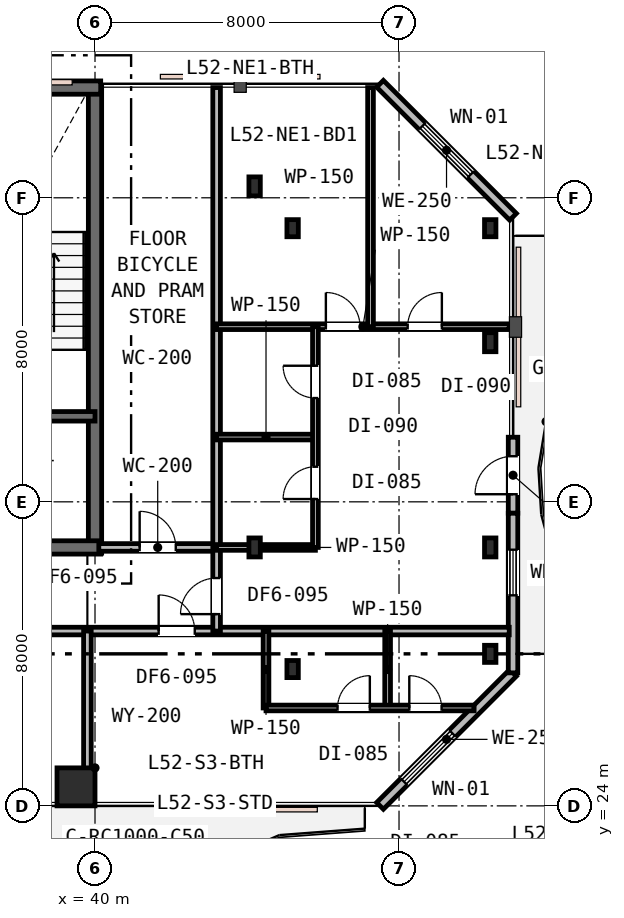
"""IFC4 building model, lengths in metres.
Left out: names, types, materials, properties, quantities, classifications, styles, units other than length and angle.
Written with IfcOpenShell. Run it as: python <this file> out.ifc"""

import sys

from ifc_helpers import new_model, si_unit, direction, frame, frame_2d, origin, origin_2d, place, context, subcontext, project, spatial, rectangle, i_section, extrude, element, fill, save


model = new_model("IFC4")
c1 = context("Model", 3, precision=1e-05, world=origin(), true_north=direction((0.0, 1.0)))
c2 = subcontext(c1, "Body", "Model", "MODEL_VIEW")
j1 = project(units=[si_unit("LENGTHUNIT", "METRE"), si_unit("PLANEANGLEUNIT", "RADIAN")], contexts=[c1])
p1 = place(None, origin())
s1 = spatial("IfcSite", under=j1, at=p1, CompositionType="ELEMENT")
p2 = place(p1, origin())
s2 = spatial("IfcBuilding", under=s1, at=p2, CompositionType="ELEMENT")
p3 = place(p2, frame((0.0, 0.0, 201.0)))
s3 = spatial("IfcBuildingStorey", under=s2, at=p3, CompositionType="ELEMENT", Elevation=201.0)
p4 = place(p3, frame((40.0, 30.65, 0.0), z_axis=(0.0, 0.0, 1.0), x_axis=(0.0, 1.0, 0.0)))
e1 = element("IfcWall", 1, at=p4, inside=s3, PredefinedType="SHEAR", context=c2, shape_type="SweptSolid", body=[
    extrude(rectangle(XDim=12.3, YDim=0.35, at=frame_2d((6.15, 0.0))), origin(), (0.0, 0.0, 1.0), 3.6),
])
p5 = place(p3, frame((15.85, 42.9, 0.0), z_axis=(0.0, 0.0, 1.0), x_axis=(1.0, 0.0, 0.0)))
e2 = element("IfcWall", 2, at=p5, inside=s3, PredefinedType="SHEAR", context=c2, shape_type="SweptSolid", body=[
    extrude(rectangle(XDim=24.3, YDim=0.35, at=frame_2d((12.15, 0.0))), origin(), (0.0, 0.0, 1.0), 3.6),
])
p6 = place(p3, frame((28.95, 30.8, 0.0), z_axis=(0.0, 0.0, 1.0), x_axis=(1.0, 0.0, 0.0)))
e3 = element("IfcWall", 3, at=p6, inside=s3, PredefinedType="SHEAR", context=c2, shape_type="SweptSolid", body=[
    extrude(rectangle(XDim=11.2, YDim=0.35, at=frame_2d((5.6, 0.0))), origin(), (0.0, 0.0, 1.0), 3.6),
])
p7 = place(p6, frame((7.65, 0.0, 0.0)))
e4 = element("IfcOpeningElement", 4, at=p7, cuts=e3, PredefinedType="OPENING", context=c2, shape_type="SweptSolid", body=[
    extrude(rectangle(XDim=1.1, YDim=2.15, at=frame_2d((0.55, 1.075))), frame((0.0, 0.185, 0.0), z_axis=(0.0, -1.0, 0.0), x_axis=(1.0, 0.0, 0.0)), (0.0, 0.0, 1.0), 0.37),
])
p8 = place(p3, frame((33.95, 34.25, 0.0), z_axis=(0.0, 0.0, 1.0), x_axis=(1.0, 0.0, 0.0)))
e5 = element("IfcWall", 5, at=p8, inside=s3, PredefinedType="SHEAR", context=c2, shape_type="SweptSolid", body=[
    extrude(rectangle(XDim=6.05, YDim=0.25, at=frame_2d((3.025, 0.0))), origin(), (0.0, 0.0, 1.0), 3.6),
])
p9 = place(p8, frame((3.7, 0.0, 0.0)))
e6 = element("IfcOpeningElement", 6, at=p9, cuts=e5, PredefinedType="OPENING", context=c2, shape_type="SweptSolid", body=[
    extrude(rectangle(XDim=1.0, YDim=2.15, at=frame_2d((0.5, 1.075))), frame((0.0, 0.135, 0.0), z_axis=(0.0, -1.0, 0.0), x_axis=(1.0, 0.0, 0.0)), (0.0, 0.0, 1.0), 0.27),
])
p10 = place(p8, frame((0.55, 0.0, 0.0)))
e7 = element("IfcOpeningElement", 7, at=p10, cuts=e5, PredefinedType="OPENING", context=c2, shape_type="SweptSolid", body=[
    extrude(rectangle(XDim=1.1, YDim=2.15, at=frame_2d((0.55, 1.075))), frame((0.0, 0.135, 0.0), z_axis=(0.0, -1.0, 0.0), x_axis=(1.0, 0.0, 0.0)), (0.0, 0.0, 1.0), 0.27),
])
p11 = place(p3, frame((39.5, 24.5, 0.0), z_axis=(0.0, 0.0, 1.0), x_axis=(1.0, 0.0, 0.0)))
e8 = element("IfcColumn", 8, at=p11, inside=s3, PredefinedType="COLUMN", context=c2, shape_type="SweptSolid", body=[
    extrude(rectangle(XDim=1.0, YDim=1.0, at=origin_2d()), origin(), (0.0, 0.0, 1.0), 3.6),
])
for number, where, z_axis, x_axis in (
    (9, (45.2, 27.6, 0.0), (0.0, 0.0, 1.0), (1.0, 0.0, 0.0)),
    (10, (45.2, 39.2, 0.0), (0.0, 0.0, 1.0), (1.0, 0.0, 0.0)),
    (11, (50.4, 28.0, 0.0), (0.0, 0.0, 1.0), (1.0, 0.0, 0.0)),
    (12, (50.4, 39.2, 0.0), (0.0, 0.0, 1.0), (1.0, 0.0, 0.0)),
):
    element("IfcColumn", number, at=place(p3, frame(where, z_axis=z_axis, x_axis=x_axis)), inside=s3, PredefinedType="COLUMN", context=c2, shape_type="SweptSolid", body=[
        extrude(i_section(OverallWidth=0.3, OverallDepth=0.45, WebThickness=0.014, FlangeThickness=0.026, FilletRadius=0.027, at=origin_2d()), origin(), (0.0, 0.0, 1.0), 3.6),
    ])
for number, where, z_axis, x_axis in (
    (13, (44.2, 30.8, 0.0), (0.0, 0.0, 1.0), (1.0, 0.0, 0.0)),
    (14, (44.2, 40.3, 0.0), (0.0, 0.0, 1.0), (1.0, 0.0, 0.0)),
    (15, (50.4, 30.8, 0.0), (0.0, 0.0, 1.0), (1.0, 0.0, 0.0)),
    (16, (50.4, 36.2, 0.0), (0.0, 0.0, 1.0), (1.0, 0.0, 0.0)),
):
    element("IfcColumn", number, at=place(p3, frame(where, z_axis=z_axis, x_axis=x_axis)), inside=s3, PredefinedType="COLUMN", context=c2, shape_type="SweptSolid", body=[
        extrude(i_section(OverallWidth=0.3, OverallDepth=0.5, WebThickness=0.015, FlangeThickness=0.028, FilletRadius=0.027, at=origin_2d()), origin(), (0.0, 0.0, 1.0), 3.6),
    ])
p12 = place(p3, frame((47.5, 24.0, 0.0), z_axis=(0.0, 0.0, 1.0), x_axis=(0.707106781187, 0.707106781187, 0.0)))
e17 = element("IfcWall", 17, at=p12, inside=s3, PredefinedType="STANDARD", context=c2, shape_type="SweptSolid", body=[
    extrude(rectangle(XDim=4.95, YDim=0.25, at=frame_2d((2.475, 0.0))), origin(), (0.0, 0.0, 1.0), 3.33),
])
p13 = place(p12, frame((0.896, 0.0, 0.75)))
e18 = element("IfcOpeningElement", 18, at=p13, cuts=e17, PredefinedType="OPENING", context=c2, shape_type="SweptSolid", body=[
    extrude(rectangle(XDim=1.8, YDim=1.85, at=frame_2d((0.9, 0.925))), frame((0.0, 0.135, 0.0), z_axis=(0.0, -1.0, 0.0), x_axis=(1.0, 0.0, 0.0)), (0.0, 0.0, 1.0), 0.27),
])
p14 = place(p3, frame((51.0, 31.7, 0.0), z_axis=(0.0, 0.0, 1.0), x_axis=(0.0, 1.0, 0.0)))
e19 = element("IfcWall", 19, at=p14, inside=s3, PredefinedType="STANDARD", context=c2, shape_type="SweptSolid", body=[
    extrude(rectangle(XDim=2.0, YDim=0.25, at=frame_2d((1.0, 0.0))), origin(), (0.0, 0.0, 1.0), 3.33),
])
p15 = place(p14, frame((0.5, 0.0, 0.0)))
e20 = element("IfcOpeningElement", 20, at=p15, cuts=e19, PredefinedType="OPENING", context=c2, shape_type="SweptSolid", body=[
    extrude(rectangle(XDim=1.0, YDim=2.15, at=frame_2d((0.5, 1.075))), frame((0.0, 0.135, 0.0), z_axis=(0.0, -1.0, 0.0), x_axis=(1.0, 0.0, 0.0)), (0.0, 0.0, 1.0), 0.27),
])
p16 = place(p3, frame((51.0, 27.5, 0.0), z_axis=(0.0, 0.0, 1.0), x_axis=(0.0, 1.0, 0.0)))
e21 = element("IfcWall", 21, at=p16, inside=s3, PredefinedType="STANDARD", context=c2, shape_type="SweptSolid", body=[
    extrude(rectangle(XDim=4.2, YDim=0.25, at=frame_2d((2.1, 0.0))), origin(), (0.0, 0.0, 1.0), 3.33),
])
p17 = place(p16, frame((2.04, 0.0, 0.85)))
e22 = element("IfcOpeningElement", 22, at=p17, cuts=e21, PredefinedType="OPENING", context=c2, shape_type="SweptSolid", body=[
    extrude(rectangle(XDim=1.2, YDim=1.6, at=frame_2d((0.6, 0.8))), frame((0.0, 0.135, 0.0), z_axis=(0.0, -1.0, 0.0), x_axis=(1.0, 0.0, 0.0)), (0.0, 0.0, 1.0), 0.27),
])
p18 = place(p3, frame((51.0, 39.5, 0.0), z_axis=(0.0, 0.0, 1.0), x_axis=(-0.707106781187, 0.707106781187, 0.0)))
e23 = element("IfcWall", 23, at=p18, inside=s3, PredefinedType="STANDARD", context=c2, shape_type="SweptSolid", body=[
    extrude(rectangle(XDim=4.95, YDim=0.25, at=frame_2d((2.475, 0.0))), origin(), (0.0, 0.0, 1.0), 3.33),
])
p19 = place(p18, frame((1.575, 0.0, 0.75)))
e24 = element("IfcOpeningElement", 24, at=p19, cuts=e23, PredefinedType="OPENING", context=c2, shape_type="SweptSolid", body=[
    extrude(rectangle(XDim=1.8, YDim=1.85, at=frame_2d((0.9, 0.925))), frame((0.0, 0.135, 0.0), z_axis=(0.0, -1.0, 0.0), x_axis=(1.0, 0.0, 0.0)), (0.0, 0.0, 1.0), 0.27),
])
p20 = place(p3, frame((15.4, 28.6, 0.0), z_axis=(0.0, 0.0, 1.0), x_axis=(1.0, 0.0, 0.0)))
e25 = element("IfcWall", 25, at=p20, inside=s3, PredefinedType="PARTITIONING", context=c2, shape_type="SweptSolid", body=[
    extrude(rectangle(XDim=35.5, YDim=0.2, at=frame_2d((17.75, 0.0))), origin(), (0.0, 0.0, 1.0), 2.72),
])
p21 = place(p20, frame((11.525, 0.0, 0.0)))
e26 = element("IfcOpeningElement", 26, at=p21, cuts=e25, PredefinedType="OPENING", context=c2, shape_type="SweptSolid", body=[
    extrude(rectangle(XDim=0.95, YDim=2.15, at=frame_2d((0.475, 1.075))), frame((0.0, 0.11, 0.0), z_axis=(0.0, -1.0, 0.0), x_axis=(1.0, 0.0, 0.0)), (0.0, 0.0, 1.0), 0.22),
])
p22 = place(p20, frame((19.425, 0.0, 0.0)))
e27 = element("IfcOpeningElement", 27, at=p22, cuts=e25, PredefinedType="OPENING", context=c2, shape_type="SweptSolid", body=[
    extrude(rectangle(XDim=0.95, YDim=2.15, at=frame_2d((0.475, 1.075))), frame((0.0, 0.11, 0.0), z_axis=(0.0, -1.0, 0.0), x_axis=(1.0, 0.0, 0.0)), (0.0, 0.0, 1.0), 0.22),
])
p23 = place(p20, frame((26.275, 0.0, 0.0)))
e28 = element("IfcOpeningElement", 28, at=p23, cuts=e25, PredefinedType="OPENING", context=c2, shape_type="SweptSolid", body=[
    extrude(rectangle(XDim=0.95, YDim=2.15, at=frame_2d((0.475, 1.075))), frame((0.0, 0.11, 0.0), z_axis=(0.0, -1.0, 0.0), x_axis=(1.0, 0.0, 0.0)), (0.0, 0.0, 1.0), 0.22),
])
p24 = place(p3, frame((40.1, 30.8, 0.0), z_axis=(0.0, 0.0, 1.0), x_axis=(1.0, 0.0, 0.0)))
e29 = element("IfcWall", 29, at=p24, inside=s3, PredefinedType="PARTITIONING", context=c2, shape_type="SweptSolid", body=[
    extrude(rectangle(XDim=3.1, YDim=0.2, at=frame_2d((1.55, 0.0))), origin(), (0.0, 0.0, 1.0), 2.72),
])
p25 = place(p24, frame((1.075, 0.0, 0.0)))
e30 = element("IfcOpeningElement", 30, at=p25, cuts=e29, PredefinedType="OPENING", context=c2, shape_type="SweptSolid", body=[
    extrude(rectangle(XDim=0.95, YDim=2.15, at=frame_2d((0.475, 1.075))), frame((0.0, 0.11, 0.0), z_axis=(0.0, -1.0, 0.0), x_axis=(1.0, 0.0, 0.0)), (0.0, 0.0, 1.0), 0.22),
])
p26 = place(p3, frame((43.2, 28.6, 0.0), z_axis=(0.0, 0.0, 1.0), x_axis=(0.0, 1.0, 0.0)))
e31 = element("IfcWall", 31, at=p26, inside=s3, PredefinedType="PARTITIONING", context=c2, shape_type="SweptSolid", body=[
    extrude(rectangle(XDim=14.3, YDim=0.2, at=frame_2d((7.15, 0.0))), origin(), (0.0, 0.0, 1.0), 2.72),
])
p27 = place(p26, frame((0.445, 0.0, 0.0)))
e32 = element("IfcOpeningElement", 32, at=p27, cuts=e31, PredefinedType="OPENING", context=c2, shape_type="SweptSolid", body=[
    extrude(rectangle(XDim=0.95, YDim=2.15, at=frame_2d((0.475, 1.075))), frame((0.0, 0.11, 0.0), z_axis=(0.0, -1.0, 0.0), x_axis=(1.0, 0.0, 0.0)), (0.0, 0.0, 1.0), 0.22),
])
for number, where, z_axis, x_axis in (
    (33, (43.2, 30.8, 0.0), (0.0, 0.0, 1.0), (1.0, 0.0, 0.0)),
    (34, (43.2, 33.704, 0.0), (0.0, 0.0, 1.0), (1.0, 0.0, 0.0)),
):
    element("IfcWall", number, at=place(p3, frame(where, z_axis=z_axis, x_axis=x_axis)), inside=s3, PredefinedType="PARTITIONING", context=c2, shape_type="SweptSolid", body=[
        extrude(rectangle(XDim=2.6, YDim=0.15, at=frame_2d((1.3, 0.0))), origin(), (0.0, 0.0, 1.0), 2.72),
    ])
p28 = place(p3, frame((43.2, 36.608, 0.0), z_axis=(0.0, 0.0, 1.0), x_axis=(1.0, 0.0, 0.0)))
e35 = element("IfcWall", 35, at=p28, inside=s3, PredefinedType="PARTITIONING", context=c2, shape_type="SweptSolid", body=[
    extrude(rectangle(XDim=7.7, YDim=0.15, at=frame_2d((3.85, 0.0))), origin(), (0.0, 0.0, 1.0), 2.72),
])
p29 = place(p28, frame((2.875, 0.0, 0.0)))
e36 = element("IfcOpeningElement", 36, at=p29, cuts=e35, PredefinedType="OPENING", context=c2, shape_type="SweptSolid", body=[
    extrude(rectangle(XDim=0.9, YDim=2.15, at=frame_2d((0.45, 1.075))), frame((0.0, 0.085, 0.0), z_axis=(0.0, -1.0, 0.0), x_axis=(1.0, 0.0, 0.0)), (0.0, 0.0, 1.0), 0.17),
])
p30 = place(p28, frame((5.027, 0.0, 0.0)))
e37 = element("IfcOpeningElement", 37, at=p30, cuts=e35, PredefinedType="OPENING", context=c2, shape_type="SweptSolid", body=[
    extrude(rectangle(XDim=0.9, YDim=2.15, at=frame_2d((0.45, 1.075))), frame((0.0, 0.085, 0.0), z_axis=(0.0, -1.0, 0.0), x_axis=(1.0, 0.0, 0.0)), (0.0, 0.0, 1.0), 0.17),
])
p31 = place(p3, frame((45.8, 30.8, 0.0), z_axis=(0.0, 0.0, 1.0), x_axis=(0.0, 1.0, 0.0)))
e38 = element("IfcWall", 38, at=p31, inside=s3, PredefinedType="PARTITIONING", context=c2, shape_type="SweptSolid", body=[
    extrude(rectangle(XDim=5.808, YDim=0.15, at=frame_2d((2.904, 0.0))), origin(), (0.0, 0.0, 1.0), 2.72),
])
p32 = place(p31, frame((1.274, 0.0, 0.0)))
e39 = element("IfcOpeningElement", 39, at=p32, cuts=e38, PredefinedType="OPENING", context=c2, shape_type="SweptSolid", body=[
    extrude(rectangle(XDim=0.85, YDim=2.15, at=frame_2d((0.425, 1.075))), frame((0.0, 0.085, 0.0), z_axis=(0.0, -1.0, 0.0), x_axis=(1.0, 0.0, 0.0)), (0.0, 0.0, 1.0), 0.17),
])
p33 = place(p31, frame((3.931, 0.0, 0.0)))
e40 = element("IfcOpeningElement", 40, at=p33, cuts=e38, PredefinedType="OPENING", context=c2, shape_type="SweptSolid", body=[
    extrude(rectangle(XDim=0.85, YDim=2.15, at=frame_2d((0.425, 1.075))), frame((0.0, 0.085, 0.0), z_axis=(0.0, -1.0, 0.0), x_axis=(1.0, 0.0, 0.0)), (0.0, 0.0, 1.0), 0.17),
])
p34 = place(p3, frame((47.25, 36.608, 0.0), z_axis=(0.0, 0.0, 1.0), x_axis=(0.0, 1.0, 0.0)))
e41 = element("IfcWall", 41, at=p34, inside=s3, PredefinedType="PARTITIONING", context=c2, shape_type="SweptSolid", body=[
    extrude(rectangle(XDim=6.292, YDim=0.15, at=frame_2d((3.146, 0.0))), origin(), (0.0, 0.0, 1.0), 3.04),
])
p35 = place(p3, frame((39.8, 24.1, 0.0), z_axis=(0.0, 0.0, 1.0), x_axis=(0.0, 1.0, 0.0)))
e42 = element("IfcWall", 42, at=p35, inside=s3, PredefinedType="PARTITIONING", context=c2, shape_type="SweptSolid", body=[
    extrude(rectangle(XDim=4.5, YDim=0.2, at=frame_2d((2.25, 0.0))), origin(), (0.0, 0.0, 1.0), 2.72),
])
for number, where, z_axis, x_axis in (
    (43, (44.5, 26.576, 0.0), (0.0, 0.0, 1.0), (0.0, 1.0, 0.0)),
    (44, (47.7, 26.576, 0.0), (0.0, 0.0, 1.0), (0.0, 1.0, 0.0)),
):
    element("IfcWall", number, at=place(p3, frame(where, z_axis=z_axis, x_axis=x_axis)), inside=s3, PredefinedType="PARTITIONING", context=c2, shape_type="SweptSolid", body=[
        extrude(rectangle(XDim=2.024, YDim=0.15, at=frame_2d((1.012, 0.0))), origin(), (0.0, 0.0, 1.0), 3.33),
    ])
p36 = place(p3, frame((44.5, 26.576, 0.0), z_axis=(0.0, 0.0, 1.0), x_axis=(1.0, 0.0, 0.0)))
e45 = element("IfcWall", 45, at=p36, inside=s3, PredefinedType="PARTITIONING", context=c2, shape_type="SweptSolid", body=[
    extrude(rectangle(XDim=5.476, YDim=0.15, at=frame_2d((2.738, 0.0))), origin(), (0.0, 0.0, 1.0), 3.33),
])
p37 = place(p36, frame((1.882, 0.0, 0.0)))
e46 = element("IfcOpeningElement", 46, at=p37, cuts=e45, PredefinedType="OPENING", context=c2, shape_type="SweptSolid", body=[
    extrude(rectangle(XDim=0.85, YDim=2.15, at=frame_2d((0.425, 1.075))), frame((0.0, 0.085, 0.0), z_axis=(0.0, -1.0, 0.0), x_axis=(1.0, 0.0, 0.0)), (0.0, 0.0, 1.0), 0.17),
])
p38 = place(p36, frame((3.77, 0.0, 0.0)))
e47 = element("IfcOpeningElement", 47, at=p38, cuts=e45, PredefinedType="OPENING", context=c2, shape_type="SweptSolid", body=[
    extrude(rectangle(XDim=0.85, YDim=2.15, at=frame_2d((0.425, 1.075))), frame((0.0, 0.085, 0.0), z_axis=(0.0, -1.0, 0.0), x_axis=(1.0, 0.0, 0.0)), (0.0, 0.0, 1.0), 0.17),
])
p39 = place(p13, origin())
e48 = element("IfcWindow", 48, at=p39, inside=s3, PartitioningType="SINGLE_PANEL", PredefinedType="WINDOW", context=c2, shape_type="SweptSolid", body=[
    extrude(rectangle(XDim=1.8, YDim=1.85, at=frame_2d((0.9, 0.925))), frame((0.0, 0.03, 0.0), z_axis=(0.0, -1.0, 0.0), x_axis=(1.0, 0.0, 0.0)), (0.0, 0.0, 1.0), 0.06),
])
fill(e18, e48)
p40 = place(p15, origin())
e49 = element("IfcDoor", 49, at=p40, inside=s3, OperationType="SINGLE_SWING_LEFT", PredefinedType="DOOR", context=c2, shape_type="SweptSolid", body=[
    extrude(rectangle(XDim=1.0, YDim=2.15, at=frame_2d((0.5, 1.075))), frame((0.0, 0.025, 0.0), z_axis=(0.0, -1.0, 0.0), x_axis=(1.0, 0.0, 0.0)), (0.0, 0.0, 1.0), 0.05),
])
fill(e20, e49)
p41 = place(p17, origin())
e50 = element("IfcWindow", 50, at=p41, inside=s3, PartitioningType="SINGLE_PANEL", PredefinedType="WINDOW", context=c2, shape_type="SweptSolid", body=[
    extrude(rectangle(XDim=1.2, YDim=1.6, at=frame_2d((0.6, 0.8))), frame((0.0, 0.03, 0.0), z_axis=(0.0, -1.0, 0.0), x_axis=(1.0, 0.0, 0.0)), (0.0, 0.0, 1.0), 0.06),
])
fill(e22, e50)
p42 = place(p19, origin())
e51 = element("IfcWindow", 51, at=p42, inside=s3, PartitioningType="SINGLE_PANEL", PredefinedType="WINDOW", context=c2, shape_type="SweptSolid", body=[
    extrude(rectangle(XDim=1.8, YDim=1.85, at=frame_2d((0.9, 0.925))), frame((0.0, 0.03, 0.0), z_axis=(0.0, -1.0, 0.0), x_axis=(1.0, 0.0, 0.0)), (0.0, 0.0, 1.0), 0.06),
])
fill(e24, e51)
p43 = place(p25, origin())
e52 = element("IfcDoor", 52, at=p43, inside=s3, OperationType="SINGLE_SWING_LEFT", PredefinedType="DOOR", context=c2, shape_type="SweptSolid", body=[
    extrude(rectangle(XDim=0.95, YDim=2.15, at=frame_2d((0.475, 1.075))), frame((0.0, 0.025, 0.0), z_axis=(0.0, -1.0, 0.0), x_axis=(1.0, 0.0, 0.0)), (0.0, 0.0, 1.0), 0.05),
])
fill(e30, e52)
p44 = place(p27, origin())
e53 = element("IfcDoor", 53, at=p44, inside=s3, OperationType="SINGLE_SWING_LEFT", PredefinedType="DOOR", context=c2, shape_type="SweptSolid", body=[
    extrude(rectangle(XDim=0.95, YDim=2.15, at=frame_2d((0.475, 1.075))), frame((0.0, 0.025, 0.0), z_axis=(0.0, -1.0, 0.0), x_axis=(1.0, 0.0, 0.0)), (0.0, 0.0, 1.0), 0.05),
])
fill(e32, e53)
p45 = place(p32, origin())
e54 = element("IfcDoor", 54, at=p45, inside=s3, OperationType="SINGLE_SWING_LEFT", PredefinedType="DOOR", context=c2, shape_type="SweptSolid", body=[
    extrude(rectangle(XDim=0.85, YDim=2.15, at=frame_2d((0.425, 1.075))), frame((0.0, 0.025, 0.0), z_axis=(0.0, -1.0, 0.0), x_axis=(1.0, 0.0, 0.0)), (0.0, 0.0, 1.0), 0.05),
])
fill(e39, e54)
p46 = place(p33, origin())
e55 = element("IfcDoor", 55, at=p46, inside=s3, OperationType="SINGLE_SWING_RIGHT", PredefinedType="DOOR", context=c2, shape_type="SweptSolid", body=[
    extrude(rectangle(XDim=0.85, YDim=2.15, at=frame_2d((0.425, 1.075))), frame((0.0, 0.025, 0.0), z_axis=(0.0, -1.0, 0.0), x_axis=(1.0, 0.0, 0.0)), (0.0, 0.0, 1.0), 0.05),
])
fill(e40, e55)
p47 = place(p29, origin())
e56 = element("IfcDoor", 56, at=p47, inside=s3, OperationType="SINGLE_SWING_LEFT", PredefinedType="DOOR", context=c2, shape_type="SweptSolid", body=[
    extrude(rectangle(XDim=0.9, YDim=2.15, at=frame_2d((0.45, 1.075))), frame((0.0, 0.025, 0.0), z_axis=(0.0, -1.0, 0.0), x_axis=(1.0, 0.0, 0.0)), (0.0, 0.0, 1.0), 0.05),
])
fill(e36, e56)
p48 = place(p30, origin())
e57 = element("IfcDoor", 57, at=p48, inside=s3, OperationType="SINGLE_SWING_RIGHT", PredefinedType="DOOR", context=c2, shape_type="SweptSolid", body=[
    extrude(rectangle(XDim=0.9, YDim=2.15, at=frame_2d((0.45, 1.075))), frame((0.0, 0.025, 0.0), z_axis=(0.0, -1.0, 0.0), x_axis=(1.0, 0.0, 0.0)), (0.0, 0.0, 1.0), 0.05),
])
fill(e37, e57)
p49 = place(p23, origin())
e58 = element("IfcDoor", 58, at=p49, inside=s3, OperationType="SINGLE_SWING_LEFT", PredefinedType="DOOR", context=c2, shape_type="SweptSolid", body=[
    extrude(rectangle(XDim=0.95, YDim=2.15, at=frame_2d((0.475, 1.075))), frame((0.0, 0.025, 0.0), z_axis=(0.0, -1.0, 0.0), x_axis=(1.0, 0.0, 0.0)), (0.0, 0.0, 1.0), 0.05),
])
fill(e28, e58)
p50 = place(p37, origin())
e59 = element("IfcDoor", 59, at=p50, inside=s3, OperationType="SINGLE_SWING_RIGHT", PredefinedType="DOOR", context=c2, shape_type="SweptSolid", body=[
    extrude(rectangle(XDim=0.85, YDim=2.15, at=frame_2d((0.425, 1.075))), frame((0.0, 0.025, 0.0), z_axis=(0.0, -1.0, 0.0), x_axis=(1.0, 0.0, 0.0)), (0.0, 0.0, 1.0), 0.05),
])
fill(e46, e59)
p51 = place(p38, origin())
e60 = element("IfcDoor", 60, at=p51, inside=s3, OperationType="SINGLE_SWING_LEFT", PredefinedType="DOOR", context=c2, shape_type="SweptSolid", body=[
    extrude(rectangle(XDim=0.85, YDim=2.15, at=frame_2d((0.425, 1.075))), frame((0.0, 0.025, 0.0), z_axis=(0.0, -1.0, 0.0), x_axis=(1.0, 0.0, 0.0)), (0.0, 0.0, 1.0), 0.05),
])
fill(e47, e60)
save(model, sys.argv[1])
